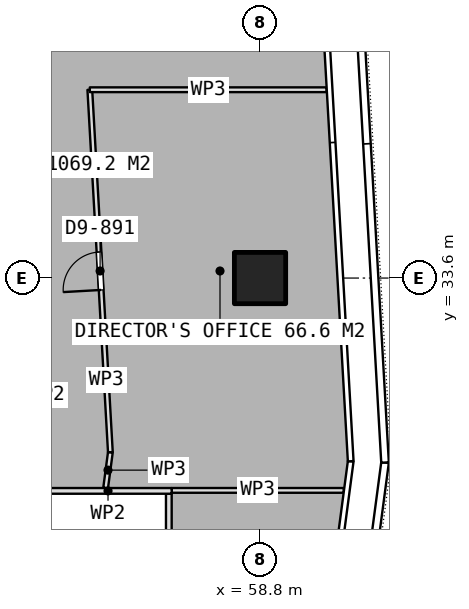
"""IFC4 building model, lengths in metres.
Left out: names, types, materials, properties, quantities, classifications, styles, units other than length and angle.
Written with IfcOpenShell. Run it as: python <this file> out.ifc"""

import sys

from ifc_helpers import new_model, si_unit, direction, frame, frame_2d, origin, origin_2d, place, context, subcontext, project, spatial, rectangle, extrude, element, fill, save


model = new_model("IFC4")
c1 = context("Model", 3, precision=1e-05, world=origin(), true_north=direction((0.0, 1.0)))
c2 = subcontext(c1, "Body", "Model", "MODEL_VIEW")
j1 = project(units=[si_unit("LENGTHUNIT", "METRE"), si_unit("PLANEANGLEUNIT", "RADIAN")], contexts=[c1])
p1 = place(None, origin())
s1 = spatial("IfcSite", under=j1, at=p1, CompositionType="ELEMENT")
p2 = place(p1, origin())
s2 = spatial("IfcBuilding", under=s1, at=p2, CompositionType="ELEMENT")
p3 = place(p2, frame((0.0, 0.0, 225.2)))
s3 = spatial("IfcBuildingStorey", under=s2, at=p3, CompositionType="ELEMENT", Elevation=225.2)
p4 = place(p3, frame((58.8, 33.6, 0.0), z_axis=(0.0, 0.0, 1.0), x_axis=(1.0, 0.0, 0.0)))
e1 = element("IfcColumn", 1, at=p4, inside=s3, PredefinedType="COLUMN", context=c2, shape_type="SweptSolid", body=[
    extrude(rectangle(XDim=1.35, YDim=1.35, at=origin_2d()), origin(), (0.0, 0.0, 1.0), 3.75),
])
p5 = place(p3, frame((53.125, 28.0, 0.0), z_axis=(0.0, 0.0, 1.0), x_axis=(1.0, 0.0, 0.0)))
e2 = element("IfcWall", 2, at=p5, inside=s3, PredefinedType="PARTITIONING", context=c2, shape_type="SweptSolid", body=[
    extrude(rectangle(XDim=3.35, YDim=0.15, at=frame_2d((1.675, 0.0))), origin(), (0.0, 0.0, 1.0), 3.5),
])
p6 = place(p3, frame((56.4, 21.075, 0.0), z_axis=(0.0, 0.0, 1.0), x_axis=(0.0, 1.0, 0.0)))
e3 = element("IfcWall", 3, at=p6, inside=s3, PredefinedType="PARTITIONING", context=c2, shape_type="SweptSolid", body=[
    extrude(rectangle(XDim=6.85, YDim=0.15, at=frame_2d((3.425, 0.0))), origin(), (0.0, 0.0, 1.0), 3.5),
])
p7 = place(p3, frame((56.476, 28.013, 0.0), z_axis=(0.0, 0.0, 1.0), x_axis=(1.0, 0.0, 0.0)))
e4 = element("IfcWall", 4, at=p7, inside=s3, PredefinedType="PARTITIONING", context=c2, shape_type="SweptSolid", body=[
    extrude(rectangle(XDim=4.528, YDim=0.125, at=frame_2d((2.264, 0.0))), origin(), (0.0, 0.0, 1.0), 3.5),
])
p8 = place(p3, frame((54.737, 28.075, 0.0), z_axis=(0.0, 0.0, 1.0), x_axis=(0.131524288557, 0.991312948326, 0.0)))
e5 = element("IfcWall", 5, at=p8, inside=s3, PredefinedType="PARTITIONING", context=c2, shape_type="SweptSolid", body=[
    extrude(rectangle(XDim=0.95, YDim=0.125, at=frame_2d((0.475, 0.0))), origin(), (0.0, 0.0, 1.0), 3.5),
])
p9 = place(p3, frame((54.862, 29.017, 0.0), z_axis=(0.0, 0.0, 1.0), x_axis=(-0.056632031714, 0.99839511867, 0.0)))
e6 = element("IfcWall", 6, at=p9, inside=s3, PredefinedType="PARTITIONING", context=c2, shape_type="SweptSolid", body=[
    extrude(rectangle(XDim=9.553, YDim=0.125, at=frame_2d((4.777, 0.0))), origin(), (0.0, 0.0, 1.0), 3.5),
])
p10 = place(p9, frame((4.277, 0.0, 0.0)))
e7 = element("IfcOpeningElement", 7, at=p10, cuts=e6, PredefinedType="OPENING", context=c2, shape_type="SweptSolid", body=[
    extrude(rectangle(XDim=1.0, YDim=2.1, at=frame_2d((0.5, 1.05))), frame((0.0, 0.073, 0.0), z_axis=(0.0, -1.0, 0.0), x_axis=(1.0, 0.0, 0.0)), (0.0, 0.0, 1.0), 0.145),
])
p11 = place(p3, frame((54.321, 38.555, 0.0), z_axis=(0.0, 0.0, 1.0), x_axis=(1.0, 0.0, 0.0)))
e8 = element("IfcWall", 8, at=p11, inside=s3, PredefinedType="PARTITIONING", context=c2, shape_type="SweptSolid", body=[
    extrude(rectangle(XDim=6.23, YDim=0.125, at=frame_2d((3.115, 0.0))), origin(), (0.0, 0.0, 1.0), 3.5),
])
p12 = place(p10, origin())
e9 = element("IfcDoor", 9, at=p12, inside=s3, OperationType="SINGLE_SWING_LEFT", PredefinedType="DOOR", context=c2, shape_type="SweptSolid", body=[
    extrude(rectangle(XDim=1.0, YDim=2.1, at=frame_2d((0.5, 1.05))), frame((0.0, 0.025, 0.0), z_axis=(0.0, -1.0, 0.0), x_axis=(1.0, 0.0, 0.0)), (0.0, 0.0, 1.0), 0.05),
])
fill(e7, e9)
save(model, sys.argv[1])
